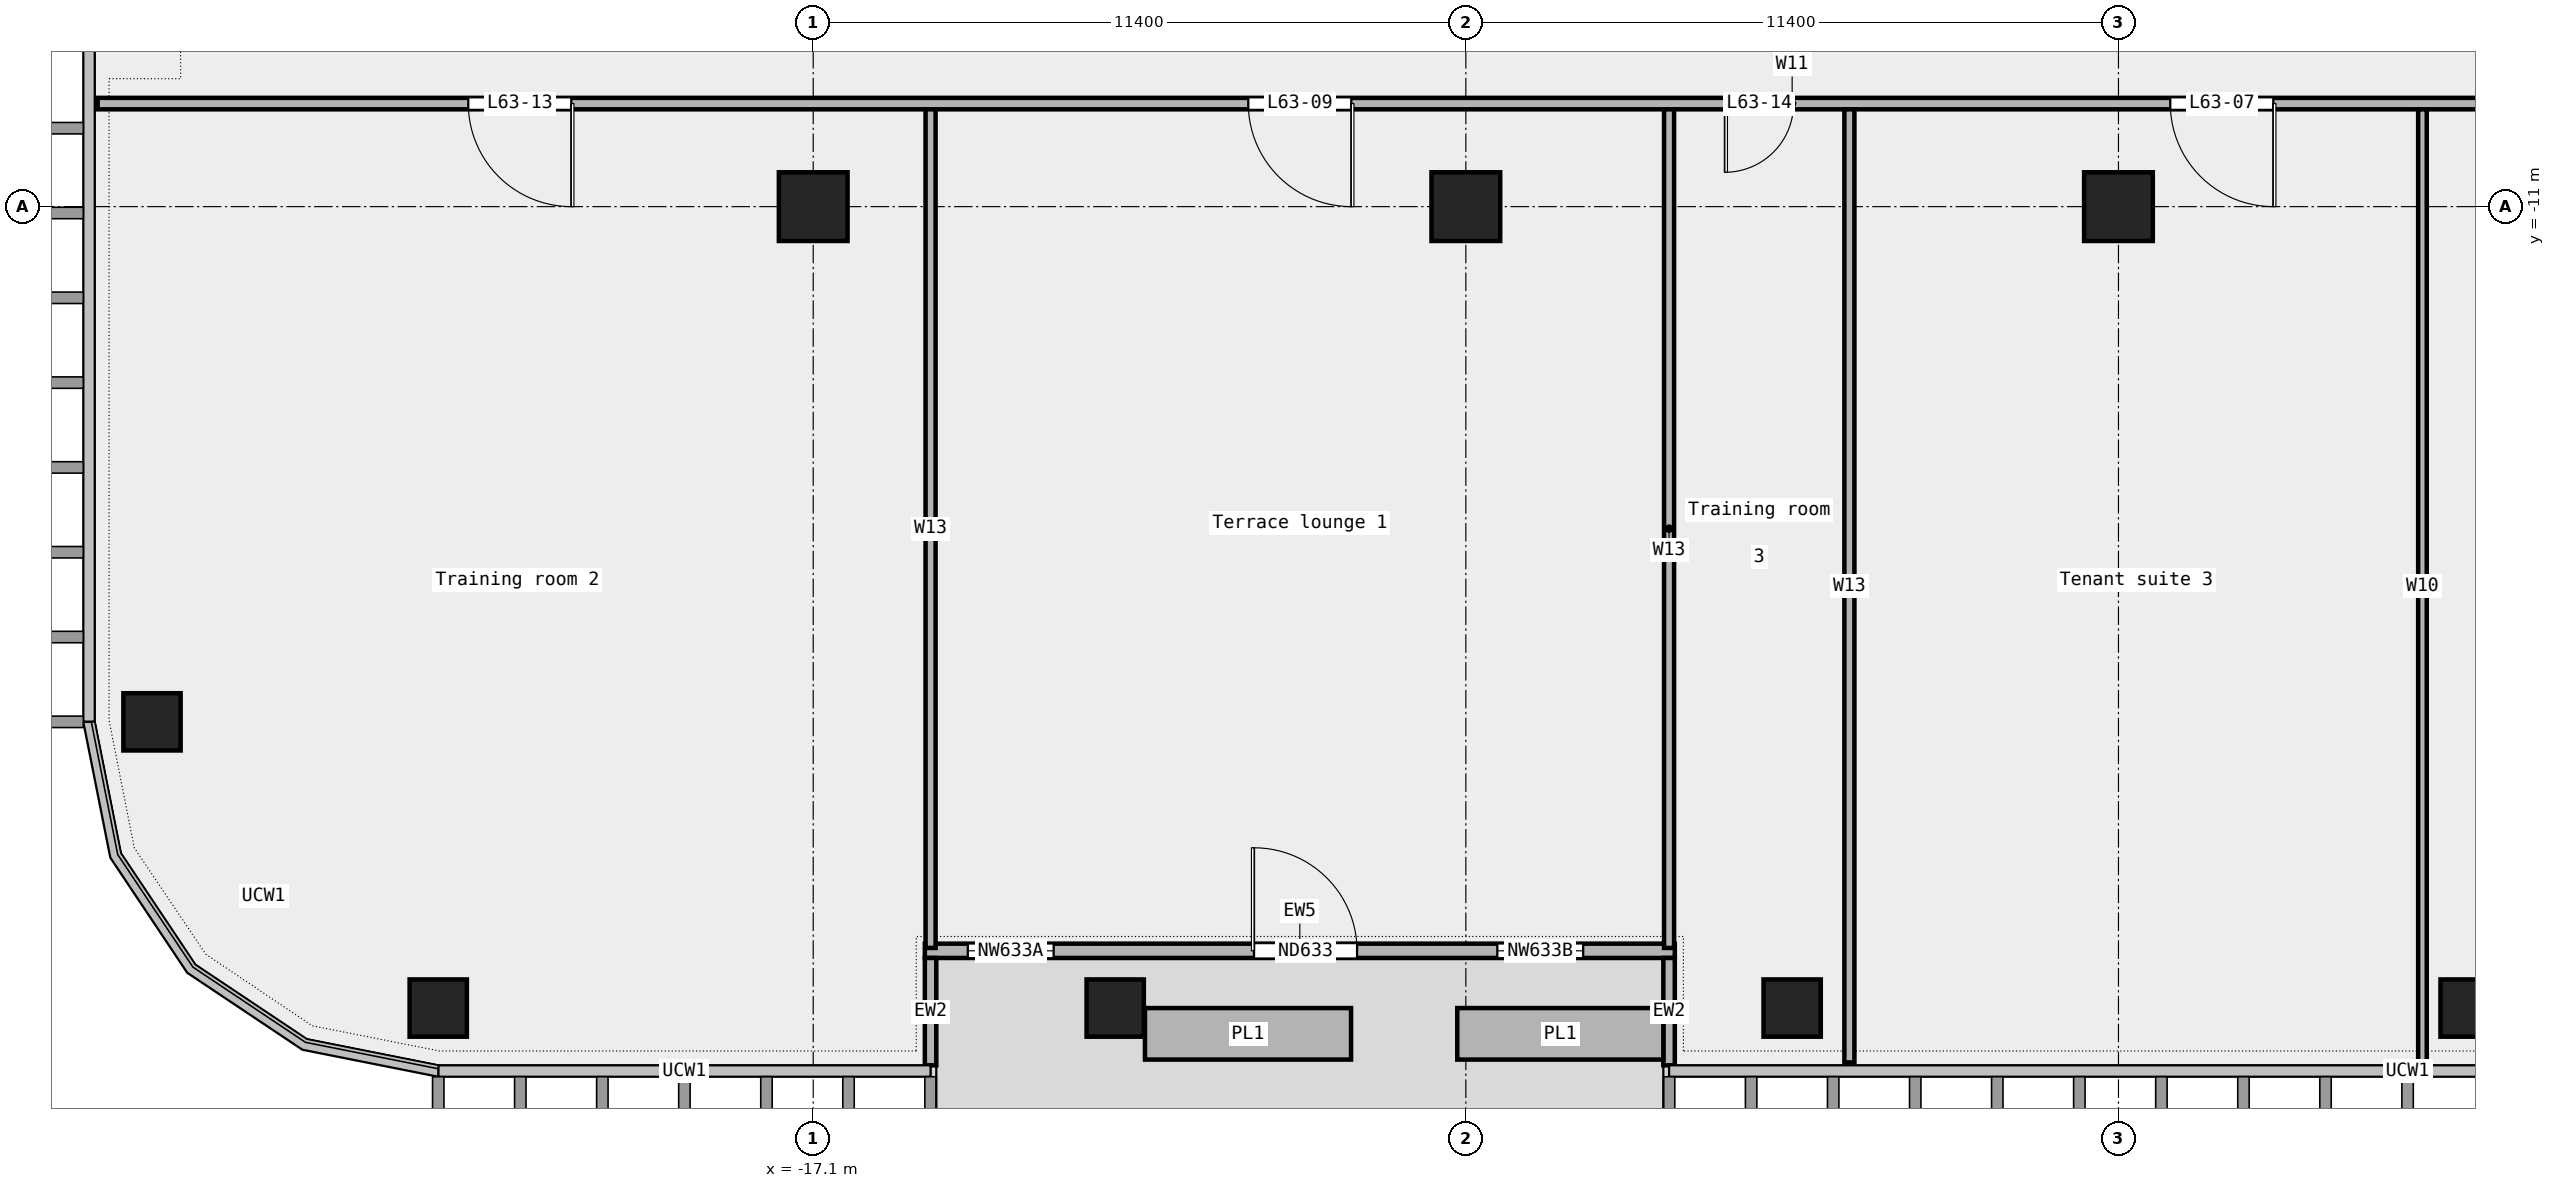
"""IFC4 building model, lengths in metres.
Left out: names, types, materials, properties, quantities, classifications, styles, units other than length and angle.
Written with IfcOpenShell. Run it as: python <this file> out.ifc"""

import sys

from ifc_helpers import new_model, si_unit, direction, frame, frame_2d, origin, origin_2d, place, context, subcontext, project, spatial, rectangle, extrude, element, fill, save


model = new_model("IFC4")
c1 = context("Model", 3, precision=1e-05, world=origin(), true_north=direction((0.0, 1.0)))
c2 = subcontext(c1, "Body", "Model", "MODEL_VIEW")
j1 = project(units=[si_unit("LENGTHUNIT", "METRE"), si_unit("PLANEANGLEUNIT", "RADIAN")], contexts=[c1])
p1 = place(None, origin())
s1 = spatial("IfcSite", under=j1, at=p1, CompositionType="ELEMENT")
p2 = place(p1, origin())
s2 = spatial("IfcBuilding", under=s1, at=p2, CompositionType="ELEMENT")
p3 = place(p2, frame((0.0, 0.0, 291.4)))
s3 = spatial("IfcBuildingStorey", under=s2, at=p3, CompositionType="ELEMENT", Elevation=291.4)
for number, where, z_axis, x_axis in (
    (1, (-23.65, -25.0, 0.0), (0.0, 0.0, 1.0), (1.0, 0.0, 0.0)),
    (2, (-11.825, -25.0, 0.0), (0.0, 0.0, 1.0), (1.0, 0.0, 0.0)),
    (3, (0.0, -25.0, 0.0), (0.0, 0.0, 1.0), (1.0, 0.0, 0.0)),
    (4, (11.825, -25.0, 0.0), (0.0, 0.0, 1.0), (1.0, 0.0, 0.0)),
    (5, (-28.65, -20.0, 0.0), (0.0, 0.0, 1.0), (1.0, 0.0, 0.0)),
):
    element("IfcColumn", number, at=place(p3, frame(where, z_axis=z_axis, x_axis=x_axis)), inside=s3, PredefinedType="COLUMN", context=c2, shape_type="SweptSolid", body=[
        extrude(rectangle(XDim=1.0, YDim=1.0, at=origin_2d()), origin(), (0.0, 0.0, 1.0), 3.6),
    ])
for number, where, z_axis, x_axis in (
    (6, (-17.1, -11.0, 0.0), (0.0, 0.0, 1.0), (1.0, 0.0, 0.0)),
    (7, (-5.7, -11.0, 0.0), (0.0, 0.0, 1.0), (1.0, 0.0, 0.0)),
    (8, (5.7, -11.0, 0.0), (0.0, 0.0, 1.0), (1.0, 0.0, 0.0)),
):
    element("IfcColumn", number, at=place(p3, frame(where, z_axis=z_axis, x_axis=x_axis)), inside=s3, PredefinedType="COLUMN", context=c2, shape_type="SweptSolid", body=[
        extrude(rectangle(XDim=1.2, YDim=1.2, at=origin_2d()), origin(), (0.0, 0.0, 1.0), 3.6),
    ])
p4 = place(p3, frame((-15.15, -24.0, 0.0), z_axis=(0.0, 0.0, 1.0), x_axis=(1.0, 0.0, 0.0)))
e9 = element("IfcWall", 9, at=p4, inside=s3, PredefinedType="STANDARD", context=c2, shape_type="SweptSolid", body=[
    extrude(rectangle(XDim=13.1, YDim=0.25, at=frame_2d((6.55, 0.0))), origin(), (0.0, 0.0, 1.0), 3.6),
])
p5 = place(p4, frame((0.75, 0.0, 0.45)))
e10 = element("IfcOpeningElement", 10, at=p5, cuts=e9, PredefinedType="OPENING", context=c2, shape_type="SweptSolid", body=[
    extrude(rectangle(XDim=1.5, YDim=2.4, at=frame_2d((0.75, 1.2))), frame((0.0, 0.137, 0.0), z_axis=(0.0, -1.0, 0.0), x_axis=(1.0, 0.0, 0.0)), (0.0, 0.0, 1.0), 0.274),
])
p6 = place(p4, frame((5.75, 0.0, 0.0)))
e11 = element("IfcOpeningElement", 11, at=p6, cuts=e9, PredefinedType="OPENING", context=c2, shape_type="SweptSolid", body=[
    extrude(rectangle(XDim=1.8, YDim=2.4, at=frame_2d((0.9, 1.2))), frame((0.0, 0.137, 0.0), z_axis=(0.0, -1.0, 0.0), x_axis=(1.0, 0.0, 0.0)), (0.0, 0.0, 1.0), 0.274),
])
p7 = place(p4, frame((10.0, 0.0, 0.45)))
e12 = element("IfcOpeningElement", 12, at=p7, cuts=e9, PredefinedType="OPENING", context=c2, shape_type="SweptSolid", body=[
    extrude(rectangle(XDim=1.5, YDim=2.4, at=frame_2d((0.75, 1.2))), frame((0.0, 0.137, 0.0), z_axis=(0.0, -1.0, 0.0), x_axis=(1.0, 0.0, 0.0)), (0.0, 0.0, 1.0), 0.274),
])
for number, where, z_axis, x_axis in (
    (13, (-15.05, -26.0, 0.0), (0.0, 0.0, 1.0), (0.0, 1.0, 0.0)),
    (14, (-2.15, -26.0, 0.0), (0.0, 0.0, 1.0), (0.0, 1.0, 0.0)),
):
    element("IfcWall", number, at=place(p3, frame(where, z_axis=z_axis, x_axis=x_axis)), inside=s3, PredefinedType="STANDARD", context=c2, shape_type="SweptSolid", body=[
        extrude(rectangle(XDim=1.875, YDim=0.2, at=frame_2d((0.938, 0.0))), origin(), (0.0, 0.0, 1.0), 3.6),
    ])
for number, where, z_axis, x_axis in (
    (15, (-11.305, -25.45, 0.0), (0.0, 0.0, 1.0), (1.0, 0.0, 0.0)),
    (16, (-5.85, -25.45, 0.0), (0.0, 0.0, 1.0), (1.0, 0.0, 0.0)),
):
    element("IfcWall", number, at=place(p3, frame(where, z_axis=z_axis, x_axis=x_axis)), inside=s3, PredefinedType="STANDARD", context=c2, shape_type="SweptSolid", body=[
        extrude(rectangle(XDim=3.6, YDim=0.9, at=frame_2d((1.8, 0.0))), origin(), (0.0, 0.0, 1.0), 0.7),
    ])
p8 = place(p3, frame((-29.6, -9.2, 0.0), z_axis=(0.0, 0.0, 1.0), x_axis=(1.0, 0.0, 0.0)))
e17 = element("IfcWall", 17, at=p8, inside=s3, PredefinedType="PARTITIONING", context=c2, shape_type="SweptSolid", body=[
    extrude(rectangle(XDim=59.2, YDim=0.2, at=frame_2d((29.6, 0.0))), origin(), (0.0, 0.0, 1.0), 3.6),
])
p9 = place(p8, frame((48.905, 0.0, 0.0)))
e18 = element("IfcOpeningElement", 18, at=p9, cuts=e17, PredefinedType="OPENING", context=c2, shape_type="SweptSolid", body=[
    extrude(rectangle(XDim=1.8, YDim=2.1, at=frame_2d((0.9, 1.05))), frame((0.0, 0.112, 0.0), z_axis=(0.0, -1.0, 0.0), x_axis=(1.0, 0.0, 0.0)), (0.0, 0.0, 1.0), 0.224),
])
p10 = place(p8, frame((36.205, 0.0, 0.0)))
e19 = element("IfcOpeningElement", 19, at=p10, cuts=e17, PredefinedType="OPENING", context=c2, shape_type="SweptSolid", body=[
    extrude(rectangle(XDim=1.8, YDim=2.1, at=frame_2d((0.9, 1.05))), frame((0.0, 0.112, 0.0), z_axis=(0.0, -1.0, 0.0), x_axis=(1.0, 0.0, 0.0)), (0.0, 0.0, 1.0), 0.224),
])
p11 = place(p8, frame((20.1, 0.0, 0.0)))
e20 = element("IfcOpeningElement", 20, at=p11, cuts=e17, PredefinedType="OPENING", context=c2, shape_type="SweptSolid", body=[
    extrude(rectangle(XDim=1.8, YDim=2.1, at=frame_2d((0.9, 1.05))), frame((0.0, 0.112, 0.0), z_axis=(0.0, -1.0, 0.0), x_axis=(1.0, 0.0, 0.0)), (0.0, 0.0, 1.0), 0.224),
])
p12 = place(p8, frame((6.475, 0.0, 0.0)))
e21 = element("IfcOpeningElement", 21, at=p12, cuts=e17, PredefinedType="OPENING", context=c2, shape_type="SweptSolid", body=[
    extrude(rectangle(XDim=1.8, YDim=2.1, at=frame_2d((0.9, 1.05))), frame((0.0, 0.112, 0.0), z_axis=(0.0, -1.0, 0.0), x_axis=(1.0, 0.0, 0.0)), (0.0, 0.0, 1.0), 0.224),
])
p13 = place(p8, frame((28.425, 0.0, 0.0)))
e22 = element("IfcOpeningElement", 22, at=p13, cuts=e17, PredefinedType="OPENING", context=c2, shape_type="SweptSolid", body=[
    extrude(rectangle(XDim=1.2, YDim=2.1, at=frame_2d((0.6, 1.05))), frame((0.0, 0.112, 0.0), z_axis=(0.0, -1.0, 0.0), x_axis=(1.0, 0.0, 0.0)), (0.0, 0.0, 1.0), 0.224),
])
for number, where, z_axis, x_axis in (
    (23, (-15.05, -23.95, 0.0), (0.0, 0.0, 1.0), (0.0, 1.0, 0.0)),
    (24, (-2.15, -23.95, 0.0), (0.0, 0.0, 1.0), (0.0, 1.0, 0.0)),
):
    element("IfcWall", number, at=place(p3, frame(where, z_axis=z_axis, x_axis=x_axis)), inside=s3, PredefinedType="PARTITIONING", context=c2, shape_type="SweptSolid", body=[
        extrude(rectangle(XDim=14.65, YDim=0.175, at=frame_2d((7.325, 0.0))), origin(), (0.0, 0.0, 1.0), 3.6),
    ])
p14 = place(p3, frame((1.0, -25.95, 0.0), z_axis=(0.0, 0.0, 1.0), x_axis=(0.0, 1.0, 0.0)))
e25 = element("IfcWall", 25, at=p14, inside=s3, PredefinedType="PARTITIONING", context=c2, shape_type="SweptSolid", body=[
    extrude(rectangle(XDim=16.65, YDim=0.175, at=frame_2d((8.325, 0.0))), origin(), (0.0, 0.0, 1.0), 3.6),
])
p15 = place(p3, frame((11.01, -25.95, 0.0), z_axis=(0.0, 0.0, 1.0), x_axis=(0.0, 1.0, 0.0)))
e26 = element("IfcWall", 26, at=p15, inside=s3, PredefinedType="PARTITIONING", context=c2, shape_type="SweptSolid", body=[
    extrude(rectangle(XDim=16.65, YDim=0.15, at=frame_2d((8.325, 0.0))), origin(), (0.0, 0.0, 1.0), 3.6),
])
p16 = place(p5, origin())
e27 = element("IfcWindow", 27, at=p16, inside=s3, PartitioningType="SINGLE_PANEL", PredefinedType="WINDOW", context=c2, shape_type="SweptSolid", body=[
    extrude(rectangle(XDim=1.5, YDim=2.4, at=frame_2d((0.75, 1.2))), frame((0.0, 0.03, 0.0), z_axis=(0.0, -1.0, 0.0), x_axis=(1.0, 0.0, 0.0)), (0.0, 0.0, 1.0), 0.06),
])
fill(e10, e27)
p17 = place(p6, origin())
e28 = element("IfcDoor", 28, at=p17, inside=s3, OperationType="DOUBLE_DOOR_SINGLE_SWING", PredefinedType="DOOR", context=c2, shape_type="SweptSolid", body=[
    extrude(rectangle(XDim=1.8, YDim=2.4, at=frame_2d((0.9, 1.2))), frame((0.0, 0.025, 0.0), z_axis=(0.0, -1.0, 0.0), x_axis=(1.0, 0.0, 0.0)), (0.0, 0.0, 1.0), 0.05),
])
fill(e11, e28)
p18 = place(p7, origin())
e29 = element("IfcWindow", 29, at=p18, inside=s3, PartitioningType="SINGLE_PANEL", PredefinedType="WINDOW", context=c2, shape_type="SweptSolid", body=[
    extrude(rectangle(XDim=1.5, YDim=2.4, at=frame_2d((0.75, 1.2))), frame((0.0, 0.03, 0.0), z_axis=(0.0, -1.0, 0.0), x_axis=(1.0, 0.0, 0.0)), (0.0, 0.0, 1.0), 0.06),
])
fill(e12, e29)
p19 = place(p10, origin())
e30 = element("IfcDoor", 30, at=p19, inside=s3, OperationType="DOUBLE_DOOR_SINGLE_SWING", PredefinedType="DOOR", context=c2, shape_type="SweptSolid", body=[
    extrude(rectangle(XDim=1.8, YDim=2.1, at=frame_2d((0.9, 1.05))), frame((0.0, 0.025, 0.0), z_axis=(0.0, -1.0, 0.0), x_axis=(1.0, 0.0, 0.0)), (0.0, 0.0, 1.0), 0.05),
])
fill(e19, e30)
p20 = place(p11, origin())
e31 = element("IfcDoor", 31, at=p20, inside=s3, OperationType="DOUBLE_DOOR_SINGLE_SWING", PredefinedType="DOOR", context=c2, shape_type="SweptSolid", body=[
    extrude(rectangle(XDim=1.8, YDim=2.1, at=frame_2d((0.9, 1.05))), frame((0.0, 0.025, 0.0), z_axis=(0.0, -1.0, 0.0), x_axis=(1.0, 0.0, 0.0)), (0.0, 0.0, 1.0), 0.05),
])
fill(e20, e31)
p21 = place(p12, origin())
e32 = element("IfcDoor", 32, at=p21, inside=s3, OperationType="DOUBLE_DOOR_SINGLE_SWING", PredefinedType="DOOR", context=c2, shape_type="SweptSolid", body=[
    extrude(rectangle(XDim=1.8, YDim=2.1, at=frame_2d((0.9, 1.05))), frame((0.0, 0.025, 0.0), z_axis=(0.0, -1.0, 0.0), x_axis=(1.0, 0.0, 0.0)), (0.0, 0.0, 1.0), 0.05),
])
fill(e21, e32)
p22 = place(p13, origin())
e33 = element("IfcDoor", 33, at=p22, inside=s3, OperationType="SINGLE_SWING_RIGHT", PredefinedType="DOOR", context=c2, shape_type="SweptSolid", body=[
    extrude(rectangle(XDim=1.2, YDim=2.1, at=frame_2d((0.6, 1.05))), frame((0.0, 0.025, 0.0), z_axis=(0.0, -1.0, 0.0), x_axis=(1.0, 0.0, 0.0)), (0.0, 0.0, 1.0), 0.05),
])
fill(e22, e33)
save(model, sys.argv[1])
